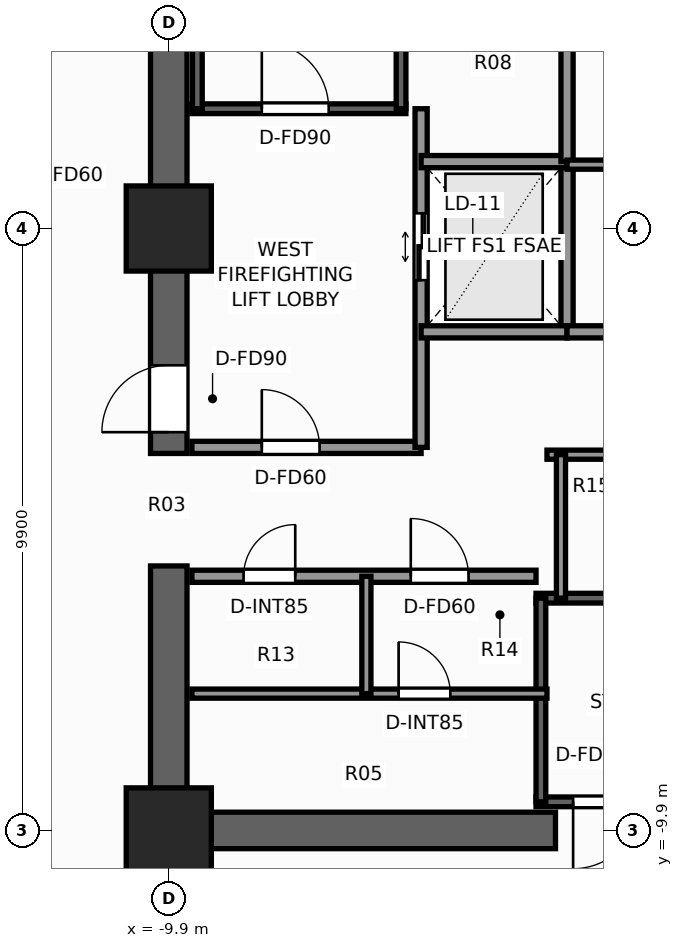
"""IFC4 building model, lengths in metres.
Left out: names, types, materials, properties, quantities, classifications, styles, units other than length and angle.
Written with IfcOpenShell. Run it as: python <this file> out.ifc"""

import sys

from ifc_helpers import new_model, si_unit, direction, frame, frame_2d, origin, origin_2d, place, context, subcontext, project, spatial, rectangle, extrude, element, fill, save


model = new_model("IFC4")
c1 = context("Model", 3, precision=1e-05, world=origin(), true_north=direction((0.0, 1.0)))
c2 = subcontext(c1, "Body", "Model", "MODEL_VIEW")
j1 = project(units=[si_unit("LENGTHUNIT", "METRE"), si_unit("PLANEANGLEUNIT", "RADIAN")], contexts=[c1])
p1 = place(None, origin())
s1 = spatial("IfcSite", under=j1, at=p1, CompositionType="ELEMENT")
p2 = place(p1, origin())
s2 = spatial("IfcBuilding", under=s1, at=p2, CompositionType="ELEMENT")
p3 = place(p2, frame((0.0, 0.0, 37.0)))
s3 = spatial("IfcBuildingStorey", under=s2, at=p3, CompositionType="ELEMENT", Elevation=37.0)
p4 = place(p3, frame((-3.54, -9.9, 0.0), z_axis=(0.0, 0.0, 1.0), x_axis=(-1.0, 0.0, 0.0)))
e1 = element("IfcWall", 1, at=p4, inside=s3, PredefinedType="SHEAR", context=c2, shape_type="SweptSolid", body=[
    extrude(rectangle(XDim=6.66, YDim=0.6, at=frame_2d((3.33, 0.0))), origin(), (0.0, 0.0, 1.0), 3.3),
])
p5 = place(p3, frame((-9.9, -9.6, 0.0), z_axis=(0.0, 0.0, 1.0), x_axis=(0.0, 1.0, 0.0)))
e2 = element("IfcWall", 2, at=p5, inside=s3, PredefinedType="SHEAR", context=c2, shape_type="SweptSolid", body=[
    extrude(rectangle(XDim=4.05, YDim=0.6, at=frame_2d((2.025, 0.0))), origin(), (0.0, 0.0, 1.0), 3.3),
])
p6 = place(p3, frame((-9.9, -3.7, 0.0), z_axis=(0.0, 0.0, 1.0), x_axis=(0.0, 1.0, 0.0)))
e3 = element("IfcWall", 3, at=p6, inside=s3, PredefinedType="SHEAR", context=c2, shape_type="SweptSolid", body=[
    extrude(rectangle(XDim=13.3, YDim=0.6, at=frame_2d((6.65, 0.0))), origin(), (0.0, 0.0, 1.0), 3.3),
])
p7 = place(p6, frame((0.35, 0.0, 0.0)))
e4 = element("IfcOpeningElement", 4, at=p7, cuts=e3, PredefinedType="OPENING", context=c2, shape_type="SweptSolid", body=[
    extrude(rectangle(XDim=1.1, YDim=2.2, at=frame_2d((0.55, 1.1))), frame((0.0, 0.31, 0.0), z_axis=(0.0, -1.0, 0.0), x_axis=(1.0, 0.0, 0.0)), (0.0, 0.0, 1.0), 0.62),
])
for number, where, z_axis, x_axis in (
    (5, (-9.9, -9.9, 0.0), (0.0, 0.0, 1.0), (1.0, 0.0, 0.0)),
    (6, (-9.9, 0.0, 0.0), (0.0, 0.0, 1.0), (1.0, 0.0, 0.0)),
):
    element("IfcColumn", number, at=place(p3, frame(where, z_axis=z_axis, x_axis=x_axis)), inside=s3, PredefinedType="COLUMN", context=c2, shape_type="SweptSolid", body=[
        extrude(rectangle(XDim=1.4, YDim=1.4, at=origin_2d()), origin(), (0.0, 0.0, 1.0), 3.3),
    ])
p8 = place(p3, frame((-9.52, 1.97, 0.0), z_axis=(0.0, 0.0, 1.0), x_axis=(1.0, 0.0, 0.0)))
e7 = element("IfcWall", 7, at=p8, inside=s3, PredefinedType="SHEAR", context=c2, shape_type="SweptSolid", body=[
    extrude(rectangle(XDim=3.52, YDim=0.16, at=frame_2d((1.76, 0.0))), origin(), (0.0, 0.0, 1.0), 3.3),
])
p9 = place(p8, frame((1.15, 0.0, 0.0)))
e8 = element("IfcOpeningElement", 8, at=p9, cuts=e7, PredefinedType="OPENING", context=c2, shape_type="SweptSolid", body=[
    extrude(rectangle(XDim=1.1, YDim=2.2, at=frame_2d((0.55, 1.1))), frame((0.0, 0.09, 0.0), z_axis=(0.0, -1.0, 0.0), x_axis=(1.0, 0.0, 0.0)), (0.0, 0.0, 1.0), 0.18),
])
for number, where, z_axis, x_axis in (
    (9, (-9.43, 1.97, 0.0), (0.0, 0.0, 1.0), (0.0, 1.0, 0.0)),
    (10, (-6.08, 1.97, 0.0), (0.0, 0.0, 1.0), (0.0, 1.0, 0.0)),
):
    element("IfcWall", number, at=place(p3, frame(where, z_axis=z_axis, x_axis=x_axis)), inside=s3, PredefinedType="SHEAR", context=c2, shape_type="SweptSolid", body=[
        extrude(rectangle(XDim=7.56, YDim=0.16, at=frame_2d((3.78, 0.0))), origin(), (0.0, 0.0, 1.0), 3.3),
    ])
p10 = place(p3, frame((3.86, -9.43, 0.0), z_axis=(0.0, 0.0, 1.0), x_axis=(-1.0, 0.0, 0.0)))
e11 = element("IfcWall", 11, at=p10, inside=s3, PredefinedType="SHEAR", context=c2, shape_type="SweptSolid", body=[
    extrude(rectangle(XDim=7.72, YDim=0.16, at=frame_2d((3.86, 0.0))), origin(), (0.0, 0.0, 1.0), 3.3),
])
p11 = place(p10, frame((6.01, 0.0, 0.0)))
e12 = element("IfcOpeningElement", 12, at=p11, cuts=e11, PredefinedType="OPENING", context=c2, shape_type="SweptSolid", body=[
    extrude(rectangle(XDim=1.1, YDim=2.2, at=frame_2d((0.55, 1.1))), frame((0.0, 0.09, 0.0), z_axis=(0.0, -1.0, 0.0), x_axis=(1.0, 0.0, 0.0)), (0.0, 0.0, 1.0), 0.18),
])
p12 = place(p3, frame((-3.86, -6.08, 0.0), z_axis=(0.0, 0.0, 1.0), x_axis=(1.0, 0.0, 0.0)))
e13 = element("IfcWall", 13, at=p12, inside=s3, PredefinedType="SHEAR", context=c2, shape_type="SweptSolid", body=[
    extrude(rectangle(XDim=7.72, YDim=0.16, at=frame_2d((3.86, 0.0))), origin(), (0.0, 0.0, 1.0), 3.3),
])
p13 = place(p3, frame((-3.78, -9.43, 0.0), z_axis=(0.0, 0.0, 1.0), x_axis=(0.0, 1.0, 0.0)))
e14 = element("IfcWall", 14, at=p13, inside=s3, PredefinedType="SHEAR", context=c2, shape_type="SweptSolid", body=[
    extrude(rectangle(XDim=3.35, YDim=0.16, at=frame_2d((1.675, 0.0))), origin(), (0.0, 0.0, 1.0), 3.3),
])
p14 = place(p3, frame((-9.52, -3.6, 0.0), z_axis=(0.0, 0.0, 1.0), x_axis=(1.0, 0.0, 0.0)))
e15 = element("IfcWall", 15, at=p14, inside=s3, PredefinedType="SOLIDWALL", context=c2, shape_type="SweptSolid", body=[
    extrude(rectangle(XDim=3.77, YDim=0.2, at=frame_2d((1.885, 0.0))), origin(), (0.0, 0.0, 1.0), 3.06),
])
p15 = place(p14, frame((1.15, 0.0, 0.0)))
e16 = element("IfcOpeningElement", 16, at=p15, cuts=e15, PredefinedType="OPENING", context=c2, shape_type="SweptSolid", body=[
    extrude(rectangle(XDim=0.95, YDim=2.06, at=frame_2d((0.475, 1.03))), frame((0.0, 0.11, 0.0), z_axis=(0.0, -1.0, 0.0), x_axis=(1.0, 0.0, 0.0)), (0.0, 0.0, 1.0), 0.22),
])
p16 = place(p3, frame((-5.75, -3.6, 0.0), z_axis=(0.0, 0.0, 1.0), x_axis=(0.0, 1.0, 0.0)))
e17 = element("IfcWall", 17, at=p16, inside=s3, PredefinedType="SOLIDWALL", context=c2, shape_type="SweptSolid", body=[
    extrude(rectangle(XDim=5.57, YDim=0.2, at=frame_2d((2.785, 0.0))), origin(), (0.0, 0.0, 1.0), 3.06),
])
p17 = place(p16, frame((2.75, 0.0, 0.0)))
e18 = element("IfcOpeningElement", 18, at=p17, cuts=e17, PredefinedType="OPENING", context=c2, shape_type="SweptSolid", body=[
    extrude(rectangle(XDim=1.1, YDim=2.2, at=frame_2d((0.55, 1.1))), frame((0.0, 0.11, 0.0), z_axis=(0.0, -1.0, 0.0), x_axis=(1.0, 0.0, 0.0)), (0.0, 0.0, 1.0), 0.22),
])
p18 = place(p3, frame((-3.35, -1.7, 0.0), z_axis=(0.0, 0.0, 1.0), x_axis=(0.0, 1.0, 0.0)))
e19 = element("IfcWall", 19, at=p18, inside=s3, PredefinedType="SOLIDWALL", context=c2, shape_type="SweptSolid", body=[
    extrude(rectangle(XDim=2.8, YDim=0.2, at=frame_2d((1.4, 0.0))), origin(), (0.0, 0.0, 1.0), 3.06),
])
for number, where, z_axis, x_axis in (
    (20, (-5.75, -1.7, 0.0), (0.0, 0.0, 1.0), (1.0, 0.0, 0.0)),
    (21, (-5.75, 1.1, 0.0), (0.0, 0.0, 1.0), (1.0, 0.0, 0.0)),
):
    element("IfcWall", number, at=place(p3, frame(where, z_axis=z_axis, x_axis=x_axis)), inside=s3, PredefinedType="SOLIDWALL", context=c2, shape_type="SweptSolid", body=[
        extrude(rectangle(XDim=2.4, YDim=0.2, at=frame_2d((1.2, 0.0))), origin(), (0.0, 0.0, 1.0), 3.06),
    ])
p19 = place(p3, frame((-9.52, -5.72, 0.0), z_axis=(0.0, 0.0, 1.0), x_axis=(1.0, 0.0, 0.0)))
e22 = element("IfcWall", 22, at=p19, inside=s3, PredefinedType="SOLIDWALL", context=c2, shape_type="SweptSolid", body=[
    extrude(rectangle(XDim=5.66, YDim=0.2, at=frame_2d((2.83, 0.0))), origin(), (0.0, 0.0, 1.0), 3.06),
])
p20 = place(p19, frame((3.6, 0.0, 0.0)))
e23 = element("IfcOpeningElement", 23, at=p20, cuts=e22, PredefinedType="OPENING", context=c2, shape_type="SweptSolid", body=[
    extrude(rectangle(XDim=0.95, YDim=2.06, at=frame_2d((0.475, 1.03))), frame((0.0, 0.11, 0.0), z_axis=(0.0, -1.0, 0.0), x_axis=(1.0, 0.0, 0.0)), (0.0, 0.0, 1.0), 0.22),
])
p21 = place(p19, frame((0.85, 0.0, 0.0)))
e24 = element("IfcOpeningElement", 24, at=p21, cuts=e22, PredefinedType="OPENING", context=c2, shape_type="SweptSolid", body=[
    extrude(rectangle(XDim=0.85, YDim=2.03, at=frame_2d((0.425, 1.015))), frame((0.0, 0.11, 0.0), z_axis=(0.0, -1.0, 0.0), x_axis=(1.0, 0.0, 0.0)), (0.0, 0.0, 1.0), 0.22),
])
p22 = place(p3, frame((-9.52, -7.65, 0.0), z_axis=(0.0, 0.0, 1.0), x_axis=(1.0, 0.0, 0.0)))
e25 = element("IfcWall", 25, at=p22, inside=s3, PredefinedType="PARTITIONING", context=c2, shape_type="SweptSolid", body=[
    extrude(rectangle(XDim=5.84, YDim=0.15, at=frame_2d((2.92, 0.0))), origin(), (0.0, 0.0, 1.0), 3.06),
])
p23 = place(p22, frame((3.4, 0.0, 0.0)))
e26 = element("IfcOpeningElement", 26, at=p23, cuts=e25, PredefinedType="OPENING", context=c2, shape_type="SweptSolid", body=[
    extrude(rectangle(XDim=0.85, YDim=2.03, at=frame_2d((0.425, 1.015))), frame((0.0, 0.085, 0.0), z_axis=(0.0, -1.0, 0.0), x_axis=(1.0, 0.0, 0.0)), (0.0, 0.0, 1.0), 0.17),
])
p24 = place(p3, frame((-6.65, -7.65, 0.0), z_axis=(0.0, 0.0, 1.0), x_axis=(0.0, 1.0, 0.0)))
e27 = element("IfcWall", 27, at=p24, inside=s3, PredefinedType="PARTITIONING", context=c2, shape_type="SweptSolid", body=[
    extrude(rectangle(XDim=1.93, YDim=0.15, at=frame_2d((0.965, 0.0))), origin(), (0.0, 0.0, 1.0), 3.06),
])
p25 = place(p3, frame((-3.35, -1.7, 0.0), z_axis=(0.0, 0.0, 1.0), x_axis=(1.0, 0.0, 0.0)))
e28 = element("IfcWall", 28, at=p25, inside=s3, PredefinedType="SOLIDWALL", context=c2, shape_type="SweptSolid", body=[
    extrude(rectangle(XDim=6.7, YDim=0.2, at=frame_2d((3.35, 0.0))), origin(), (0.0, 0.0, 1.0), 3.06),
])
p26 = place(p3, frame((-3.35, 1.1, 0.0), z_axis=(0.0, 0.0, 1.0), x_axis=(0.0, 1.0, 0.0)))
e29 = element("IfcWall", 29, at=p26, inside=s3, PredefinedType="SOLIDWALL", context=c2, shape_type="SweptSolid", body=[
    extrude(rectangle(XDim=3.2, YDim=0.2, at=frame_2d((1.6, 0.0))), origin(), (0.0, 0.0, 1.0), 3.06),
])
p27 = place(p3, frame((-3.35, 1.05, 0.0), z_axis=(0.0, 0.0, 1.0), x_axis=(1.0, 0.0, 0.0)))
e30 = element("IfcWall", 30, at=p27, inside=s3, PredefinedType="PARTITIONING", context=c2, shape_type="SweptSolid", body=[
    extrude(rectangle(XDim=6.7, YDim=0.15, at=frame_2d((3.35, 0.0))), origin(), (0.0, 0.0, 1.0), 3.06),
])
p28 = place(p27, frame((4.2, 0.0, 0.0)))
e31 = element("IfcOpeningElement", 31, at=p28, cuts=e30, PredefinedType="OPENING", context=c2, shape_type="SweptSolid", body=[
    extrude(rectangle(XDim=0.85, YDim=2.03, at=frame_2d((0.425, 1.015))), frame((0.0, 0.085, 0.0), z_axis=(0.0, -1.0, 0.0), x_axis=(1.0, 0.0, 0.0)), (0.0, 0.0, 1.0), 0.17),
])
p29 = place(p3, frame((-3.68, -3.72, 0.0), z_axis=(0.0, 0.0, 1.0), x_axis=(1.0, 0.0, 0.0)))
e32 = element("IfcWall", 32, at=p29, inside=s3, PredefinedType="PARTITIONING", context=c2, shape_type="SweptSolid", body=[
    extrude(rectangle(XDim=7.36, YDim=0.15, at=frame_2d((3.68, 0.0))), origin(), (0.0, 0.0, 1.0), 3.06),
])
p30 = place(p3, frame((-3.45, -6.08, 0.0), z_axis=(0.0, 0.0, 1.0), x_axis=(0.0, 1.0, 0.0)))
e33 = element("IfcWall", 33, at=p30, inside=s3, PredefinedType="PARTITIONING", context=c2, shape_type="SweptSolid", body=[
    extrude(rectangle(XDim=2.36, YDim=0.15, at=frame_2d((1.18, 0.0))), origin(), (0.0, 0.0, 1.0), 3.06),
])
p31 = place(p9, origin())
e34 = element("IfcDoor", 34, at=p31, inside=s3, OperationType="SINGLE_SWING_LEFT", PredefinedType="DOOR", context=c2, shape_type="SweptSolid", body=[
    extrude(rectangle(XDim=1.1, YDim=2.2, at=frame_2d((0.55, 1.1))), frame((0.0, 0.025, 0.0), z_axis=(0.0, -1.0, 0.0), x_axis=(1.0, 0.0, 0.0)), (0.0, 0.0, 1.0), 0.05),
])
fill(e8, e34)
p32 = place(p11, origin())
e35 = element("IfcDoor", 35, at=p32, inside=s3, OperationType="SINGLE_SWING_RIGHT", PredefinedType="DOOR", context=c2, shape_type="SweptSolid", body=[
    extrude(rectangle(XDim=1.1, YDim=2.2, at=frame_2d((0.55, 1.1))), frame((0.0, 0.025, 0.0), z_axis=(0.0, -1.0, 0.0), x_axis=(1.0, 0.0, 0.0)), (0.0, 0.0, 1.0), 0.05),
])
fill(e12, e35)
p33 = place(p7, origin())
e36 = element("IfcDoor", 36, at=p33, inside=s3, OperationType="SINGLE_SWING_LEFT", PredefinedType="DOOR", context=c2, shape_type="SweptSolid", body=[
    extrude(rectangle(XDim=1.1, YDim=2.2, at=frame_2d((0.55, 1.1))), frame((0.0, 0.025, 0.0), z_axis=(0.0, -1.0, 0.0), x_axis=(1.0, 0.0, 0.0)), (0.0, 0.0, 1.0), 0.05),
])
fill(e4, e36)
p34 = place(p17, origin())
e37 = element("IfcDoor", 37, at=p34, inside=s3, OperationType="DOUBLE_DOOR_SLIDING", PredefinedType="DOOR", context=c2, shape_type="SweptSolid", body=[
    extrude(rectangle(XDim=1.1, YDim=2.2, at=frame_2d((0.55, 1.1))), frame((0.0, 0.025, 0.0), z_axis=(0.0, -1.0, 0.0), x_axis=(1.0, 0.0, 0.0)), (0.0, 0.0, 1.0), 0.05),
])
fill(e18, e37)
p35 = place(p20, origin())
e38 = element("IfcDoor", 38, at=p35, inside=s3, OperationType="SINGLE_SWING_LEFT", PredefinedType="DOOR", context=c2, shape_type="SweptSolid", body=[
    extrude(rectangle(XDim=0.95, YDim=2.06, at=frame_2d((0.475, 1.03))), frame((0.0, 0.025, 0.0), z_axis=(0.0, -1.0, 0.0), x_axis=(1.0, 0.0, 0.0)), (0.0, 0.0, 1.0), 0.05),
])
fill(e23, e38)
p36 = place(p21, origin())
e39 = element("IfcDoor", 39, at=p36, inside=s3, OperationType="SINGLE_SWING_RIGHT", PredefinedType="DOOR", context=c2, shape_type="SweptSolid", body=[
    extrude(rectangle(XDim=0.85, YDim=2.03, at=frame_2d((0.425, 1.015))), frame((0.0, 0.025, 0.0), z_axis=(0.0, -1.0, 0.0), x_axis=(1.0, 0.0, 0.0)), (0.0, 0.0, 1.0), 0.05),
])
fill(e24, e39)
p37 = place(p23, origin())
e40 = element("IfcDoor", 40, at=p37, inside=s3, OperationType="SINGLE_SWING_LEFT", PredefinedType="DOOR", context=c2, shape_type="SweptSolid", body=[
    extrude(rectangle(XDim=0.85, YDim=2.03, at=frame_2d((0.425, 1.015))), frame((0.0, 0.025, 0.0), z_axis=(0.0, -1.0, 0.0), x_axis=(1.0, 0.0, 0.0)), (0.0, 0.0, 1.0), 0.05),
])
fill(e26, e40)
p38 = place(p15, origin())
e41 = element("IfcDoor", 41, at=p38, inside=s3, OperationType="SINGLE_SWING_LEFT", PredefinedType="DOOR", context=c2, shape_type="SweptSolid", body=[
    extrude(rectangle(XDim=0.95, YDim=2.06, at=frame_2d((0.475, 1.03))), frame((0.0, 0.025, 0.0), z_axis=(0.0, -1.0, 0.0), x_axis=(1.0, 0.0, 0.0)), (0.0, 0.0, 1.0), 0.05),
])
fill(e16, e41)
save(model, sys.argv[1])
